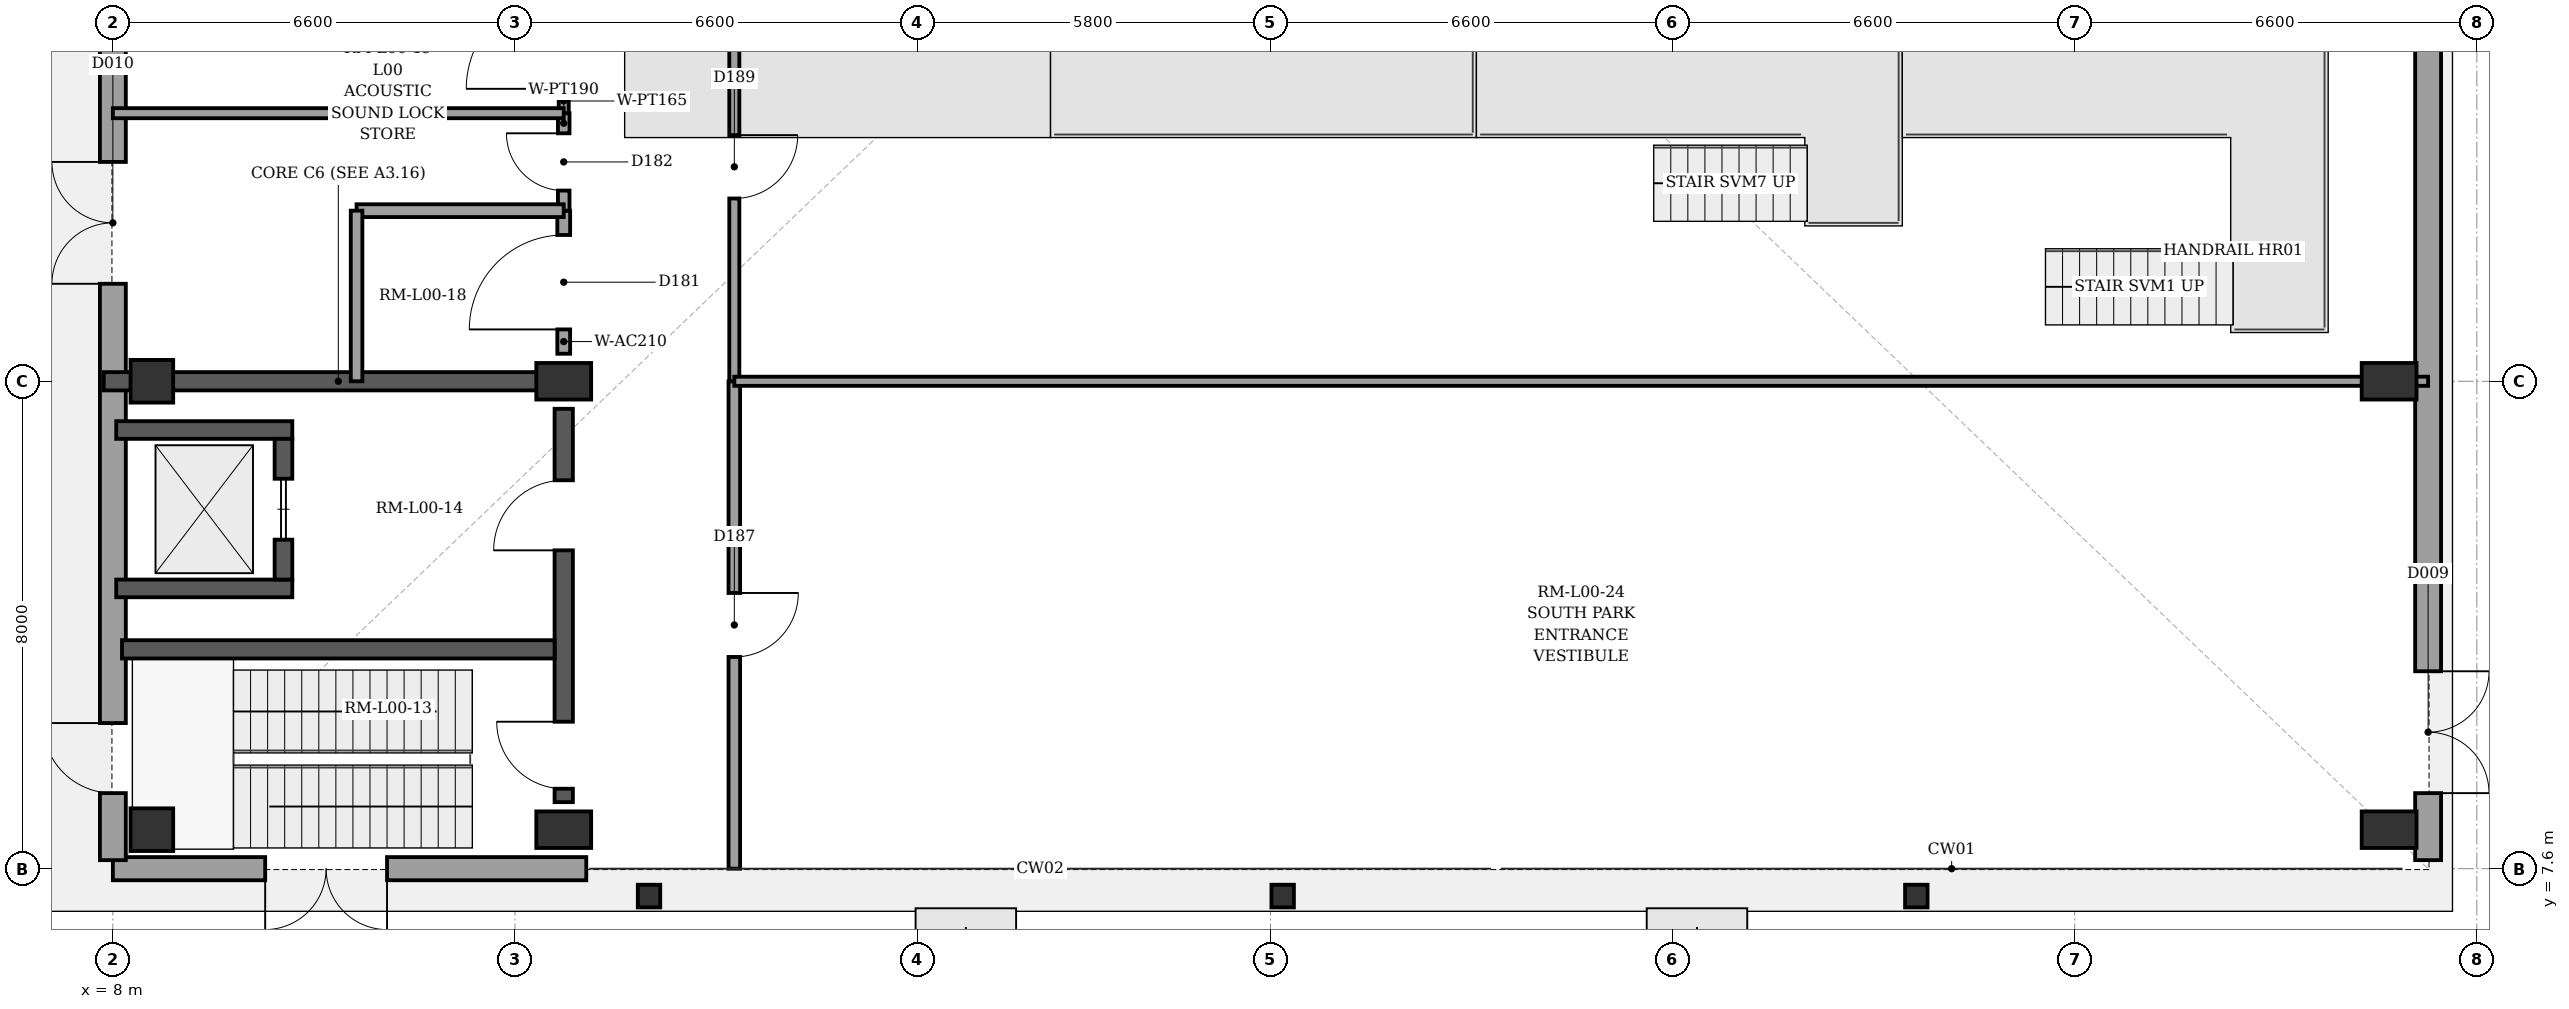
"""IFC4 building model, lengths in metres.
Left out: names, types, materials, properties, quantities, classifications, styles, units other than length and angle.
Written with IfcOpenShell. Run it as: python <this file> out.ifc"""

import sys

from ifc_helpers import new_model, si_unit, direction, frame, frame_2d, origin, origin_2d, place, context, subcontext, project, spatial, rectangle, i_section, extrude, element, fill, save


model = new_model("IFC4")
c1 = context("Model", 3, precision=1e-05, world=origin(), true_north=direction((0.0, 1.0)))
c2 = subcontext(c1, "Body", "Model", "MODEL_VIEW")
j1 = project(units=[si_unit("LENGTHUNIT", "METRE"), si_unit("PLANEANGLEUNIT", "RADIAN")], contexts=[c1])
p1 = place(None, origin())
s1 = spatial("IfcSite", under=j1, at=p1, CompositionType="ELEMENT")
p2 = place(p1, origin())
s2 = spatial("IfcBuilding", under=s1, at=p2, CompositionType="ELEMENT")
p3 = place(p2, origin())
s3 = spatial("IfcBuildingStorey", under=s2, at=p3, CompositionType="ELEMENT", Elevation=0.0)
for number, where, z_axis, x_axis in (
    (1, (8.64, 8.24, 0.0), (0.0, 0.0, 1.0), (1.0, 0.0, 0.0)),
    (2, (8.64, 15.6, 0.0), (0.0, 0.0, 1.0), (1.0, 0.0, 0.0)),
):
    element("IfcColumn", number, at=place(p3, frame(where, z_axis=z_axis, x_axis=x_axis)), inside=s3, PredefinedType="COLUMN", context=c2, shape_type="SweptSolid", body=[
        extrude(rectangle(XDim=0.7, YDim=0.7, at=origin_2d()), origin(), (0.0, 0.0, 1.0), 5.4),
    ])
for number, where, z_axis, x_axis in (
    (3, (15.4, 8.24, 0.0), (0.0, 0.0, 1.0), (1.0, 0.0, 0.0)),
    (4, (15.4, 15.6, 0.0), (0.0, 0.0, 1.0), (1.0, 0.0, 0.0)),
    (5, (45.36, 8.24, 0.0), (0.0, 0.0, 1.0), (1.0, 0.0, 0.0)),
    (6, (45.36, 15.6, 0.0), (0.0, 0.0, 1.0), (1.0, 0.0, 0.0)),
):
    element("IfcColumn", number, at=place(p3, frame(where, z_axis=z_axis, x_axis=x_axis)), inside=s3, PredefinedType="COLUMN", context=c2, shape_type="SweptSolid", body=[
        extrude(rectangle(XDim=0.6, YDim=0.9, at=origin_2d()), origin(), (0.0, 0.0, 1.0), 5.4),
    ])
for number, where, z_axis, x_axis in (
    (7, (16.8, 7.15, 0.0), (0.0, 0.0, 1.0), (1.0, 0.0, 0.0)),
    (8, (27.2, 7.15, 0.0), (0.0, 0.0, 1.0), (1.0, 0.0, 0.0)),
    (9, (37.6, 7.15, 0.0), (0.0, 0.0, 1.0), (1.0, 0.0, 0.0)),
):
    element("IfcColumn", number, at=place(p3, frame(where, z_axis=z_axis, x_axis=x_axis)), inside=s3, PredefinedType="COLUMN", context=c2, shape_type="SweptSolid", body=[
        extrude(i_section(OverallWidth=0.373, OverallDepth=0.368, WebThickness=0.014, FlangeThickness=0.024, at=origin_2d()), origin(), (0.0, 0.0, 1.0), 5.4),
    ])
p4 = place(p3, frame((46.0, 63.46, 0.0), z_axis=(0.0, 0.0, 1.0), x_axis=(0.0, -1.0, 0.0)))
e10 = element("IfcWall", 10, at=p4, inside=s3, PredefinedType="SOLIDWALL", context=c2, shape_type="SweptSolid", body=[
    extrude(rectangle(XDim=55.72, YDim=0.425, at=frame_2d((27.86, 0.0))), origin(), (0.0, 0.0, 1.0), 5.14),
])
p5 = place(p4, frame((52.62, 0.0, 0.0)))
e11 = element("IfcOpeningElement", 11, at=p5, cuts=e10, PredefinedType="OPENING", context=c2, shape_type="SweptSolid", body=[
    extrude(rectangle(XDim=2.0, YDim=2.5, at=frame_2d((1.0, 1.25))), frame((0.0, 0.222, 0.0), z_axis=(0.0, -1.0, 0.0), x_axis=(1.0, 0.0, 0.0)), (0.0, 0.0, 1.0), 0.445),
])
p6 = place(p4, frame((10.86, 0.0, 0.0)))
e12 = element("IfcOpeningElement", 12, at=p6, cuts=e10, PredefinedType="OPENING", context=c2, shape_type="SweptSolid", body=[
    extrude(rectangle(XDim=2.0, YDim=2.5, at=frame_2d((1.0, 1.25))), frame((0.0, 0.222, 0.0), z_axis=(0.0, -1.0, 0.0), x_axis=(1.0, 0.0, 0.0)), (0.0, 0.0, 1.0), 0.445),
])
p7 = place(p3, frame((15.77, 7.6, 0.0), z_axis=(0.0, 0.0, 1.0), x_axis=(-1.0, 0.0, 0.0)))
e13 = element("IfcWall", 13, at=p7, inside=s3, PredefinedType="SOLIDWALL", context=c2, shape_type="SweptSolid", body=[
    extrude(rectangle(XDim=7.77, YDim=0.38, at=frame_2d((3.885, 0.0))), origin(), (0.0, 0.0, 1.0), 5.14),
])
p8 = place(p7, frame((3.27, 0.0, 0.0)))
e14 = element("IfcOpeningElement", 14, at=p8, cuts=e13, PredefinedType="OPENING", context=c2, shape_type="SweptSolid", body=[
    extrude(rectangle(XDim=2.0, YDim=2.5, at=frame_2d((1.0, 1.25))), frame((0.0, 0.2, 0.0), z_axis=(0.0, -1.0, 0.0), x_axis=(1.0, 0.0, 0.0)), (0.0, 0.0, 1.0), 0.4),
])
p9 = place(p3, frame((8.0, 7.74, 0.0), z_axis=(0.0, 0.0, 1.0), x_axis=(0.0, 1.0, 0.0)))
e15 = element("IfcWall", 15, at=p9, inside=s3, PredefinedType="SOLIDWALL", context=c2, shape_type="SweptSolid", body=[
    extrude(rectangle(XDim=55.72, YDim=0.425, at=frame_2d((27.86, 0.0))), origin(), (0.0, 0.0, 1.0), 5.14),
])
p10 = place(p9, frame((1.1, 0.0, 0.0)))
e16 = element("IfcOpeningElement", 16, at=p10, cuts=e15, PredefinedType="OPENING", context=c2, shape_type="SweptSolid", body=[
    extrude(rectangle(XDim=1.15, YDim=2.2, at=frame_2d((0.575, 1.1))), frame((0.0, 0.222, 0.0), z_axis=(0.0, -1.0, 0.0), x_axis=(1.0, 0.0, 0.0)), (0.0, 0.0, 1.0), 0.445),
])
p11 = place(p9, frame((9.46, 0.0, 0.0)))
e17 = element("IfcOpeningElement", 17, at=p11, cuts=e15, PredefinedType="OPENING", context=c2, shape_type="SweptSolid", body=[
    extrude(rectangle(XDim=2.0, YDim=2.5, at=frame_2d((1.0, 1.25))), frame((0.0, 0.222, 0.0), z_axis=(0.0, -1.0, 0.0), x_axis=(1.0, 0.0, 0.0)), (0.0, 0.0, 1.0), 0.445),
])
p12 = place(p3, frame((7.85, 15.6, 0.0), z_axis=(0.0, 0.0, 1.0), x_axis=(1.0, 0.0, 0.0)))
e18 = element("IfcWall", 18, at=p12, inside=s3, PredefinedType="SHEAR", context=c2, shape_type="SweptSolid", body=[
    extrude(rectangle(XDim=7.248, YDim=0.3, at=frame_2d((3.624, 0.0))), origin(), (0.0, 0.0, 1.0), 5.14),
])
p13 = place(p3, frame((15.4, 8.692, 0.0), z_axis=(0.0, 0.0, 1.0), x_axis=(0.0, 1.0, 0.0)))
e19 = element("IfcWall", 19, at=p13, inside=s3, PredefinedType="SHEAR", context=c2, shape_type="SweptSolid", body=[
    extrude(rectangle(XDim=6.456, YDim=0.3, at=frame_2d((3.228, 0.0))), origin(), (0.0, 0.0, 1.0), 5.14),
])
p14 = place(p13, frame((0.22, 0.0, 0.0)))
e20 = element("IfcOpeningElement", 20, at=p14, cuts=e19, PredefinedType="OPENING", context=c2, shape_type="SweptSolid", body=[
    extrude(rectangle(XDim=1.1, YDim=2.15, at=frame_2d((0.55, 1.075))), frame((0.0, 0.16, 0.0), z_axis=(0.0, -1.0, 0.0), x_axis=(1.0, 0.0, 0.0)), (0.0, 0.0, 1.0), 0.32),
])
p15 = place(p13, frame((4.133, 0.0, 0.0)))
e21 = element("IfcOpeningElement", 21, at=p15, cuts=e19, PredefinedType="OPENING", context=c2, shape_type="SweptSolid", body=[
    extrude(rectangle(XDim=1.15, YDim=2.2, at=frame_2d((0.575, 1.1))), frame((0.0, 0.16, 0.0), z_axis=(0.0, -1.0, 0.0), x_axis=(1.0, 0.0, 0.0)), (0.0, 0.0, 1.0), 0.32),
])
p16 = place(p3, frame((8.15, 11.2, 0.0), z_axis=(0.0, 0.0, 1.0), x_axis=(1.0, 0.0, 0.0)))
e22 = element("IfcWall", 22, at=p16, inside=s3, PredefinedType="SHEAR", context=c2, shape_type="SweptSolid", body=[
    extrude(rectangle(XDim=7.1, YDim=0.3, at=frame_2d((3.55, 0.0))), origin(), (0.0, 0.0, 1.0), 5.14),
])
for number, where, z_axis, x_axis in (
    (23, (8.055, 12.2, 0.0), (0.0, 0.0, 1.0), (1.0, 0.0, 0.0)),
    (24, (8.055, 14.8, 0.0), (0.0, 0.0, 1.0), (1.0, 0.0, 0.0)),
):
    element("IfcWall", number, at=place(p3, frame(where, z_axis=z_axis, x_axis=x_axis)), inside=s3, PredefinedType="SHEAR", context=c2, shape_type="SweptSolid", body=[
        extrude(rectangle(XDim=2.89, YDim=0.29, at=frame_2d((1.445, 0.0))), origin(), (0.0, 0.0, 1.0), 5.14),
    ])
p17 = place(p3, frame((10.8, 12.345, 0.0), z_axis=(0.0, 0.0, 1.0), x_axis=(0.0, 1.0, 0.0)))
e25 = element("IfcWall", 25, at=p17, inside=s3, PredefinedType="SHEAR", context=c2, shape_type="SweptSolid", body=[
    extrude(rectangle(XDim=2.31, YDim=0.29, at=frame_2d((1.155, 0.0))), origin(), (0.0, 0.0, 1.0), 5.14),
])
p18 = place(p17, frame((0.655, 0.0, 0.0)))
e26 = element("IfcOpeningElement", 26, at=p18, cuts=e25, PredefinedType="OPENING", context=c2, shape_type="SweptSolid", body=[
    extrude(rectangle(XDim=1.0, YDim=2.15, at=frame_2d((0.5, 1.075))), frame((0.0, 0.155, 0.0), z_axis=(0.0, -1.0, 0.0), x_axis=(1.0, 0.0, 0.0)), (0.0, 0.0, 1.0), 0.31),
])
p19 = place(p3, frame((15.4, 16.052, 0.0), z_axis=(0.0, 0.0, 1.0), x_axis=(0.0, 1.0, 0.0)))
e27 = element("IfcWall", 27, at=p19, inside=s3, PredefinedType="PARTITIONING", context=c2, shape_type="SweptSolid", body=[
    extrude(rectangle(XDim=2.348, YDim=0.21, at=frame_2d((1.174, 0.0))), origin(), (0.0, 0.0, 1.0), 4.29),
])
p20 = place(p19, frame((0.399, 0.0, 0.0)))
e28 = element("IfcOpeningElement", 28, at=p20, cuts=e27, PredefinedType="OPENING", context=c2, shape_type="SweptSolid", body=[
    extrude(rectangle(XDim=1.55, YDim=2.25, at=frame_2d((0.775, 1.125))), frame((0.0, 0.115, 0.0), z_axis=(0.0, -1.0, 0.0), x_axis=(1.0, 0.0, 0.0)), (0.0, 0.0, 1.0), 0.23),
])
p21 = place(p3, frame((15.4, 18.4, 0.0), z_axis=(0.0, 0.0, 1.0), x_axis=(0.0, 1.0, 0.0)))
e29 = element("IfcWall", 29, at=p21, inside=s3, PredefinedType="PARTITIONING", context=c2, shape_type="SweptSolid", body=[
    extrude(rectangle(XDim=1.6, YDim=0.19, at=frame_2d((0.8, 0.0))), origin(), (0.0, 0.0, 1.0), 4.29),
])
p22 = place(p21, frame((0.33, 0.0, 0.0)))
e30 = element("IfcOpeningElement", 30, at=p22, cuts=e29, PredefinedType="OPENING", context=c2, shape_type="SweptSolid", body=[
    extrude(rectangle(XDim=0.94, YDim=2.15, at=frame_2d((0.47, 1.075))), frame((0.0, 0.105, 0.0), z_axis=(0.0, -1.0, 0.0), x_axis=(1.0, 0.0, 0.0)), (0.0, 0.0, 1.0), 0.21),
])
p23 = place(p3, frame((15.4, 20.0, 0.0), z_axis=(0.0, 0.0, 1.0), x_axis=(0.0, 1.0, 0.0)))
e31 = element("IfcWall", 31, at=p23, inside=s3, PredefinedType="PARTITIONING", context=c2, shape_type="SweptSolid", body=[
    extrude(rectangle(XDim=2.4, YDim=0.165, at=frame_2d((1.2, 0.0))), origin(), (0.0, 0.0, 1.0), 4.29),
])
p24 = place(p23, frame((0.4, 0.0, 0.0)))
e32 = element("IfcOpeningElement", 32, at=p24, cuts=e31, PredefinedType="OPENING", context=c2, shape_type="SweptSolid", body=[
    extrude(rectangle(XDim=1.6, YDim=2.3, at=frame_2d((0.8, 1.15))), frame((0.0, 0.093, 0.0), z_axis=(0.0, -1.0, 0.0), x_axis=(1.0, 0.0, 0.0)), (0.0, 0.0, 1.0), 0.185),
])
p25 = place(p3, frame((18.2, 15.6, 0.0), z_axis=(0.0, 0.0, 1.0), x_axis=(0.0, -1.0, 0.0)))
e33 = element("IfcWall", 33, at=p25, inside=s3, PredefinedType="PARTITIONING", context=c2, shape_type="SweptSolid", body=[
    extrude(rectangle(XDim=8.0, YDim=0.19, at=frame_2d((4.0, 0.0))), origin(), (0.0, 0.0, 1.0), 5.14),
])
p26 = place(p25, frame((3.475, 0.0, 0.0)))
e34 = element("IfcOpeningElement", 34, at=p26, cuts=e33, PredefinedType="OPENING", context=c2, shape_type="SweptSolid", body=[
    extrude(rectangle(XDim=1.05, YDim=2.15, at=frame_2d((0.525, 1.075))), frame((0.0, 0.105, 0.0), z_axis=(0.0, -1.0, 0.0), x_axis=(1.0, 0.0, 0.0)), (0.0, 0.0, 1.0), 0.21),
])
p27 = place(p3, frame((18.2, 31.6, 0.0), z_axis=(0.0, 0.0, 1.0), x_axis=(0.0, -1.0, 0.0)))
e35 = element("IfcWall", 35, at=p27, inside=s3, PredefinedType="PARTITIONING", context=c2, shape_type="SweptSolid", body=[
    extrude(rectangle(XDim=16.0, YDim=0.165, at=frame_2d((8.0, 0.0))), origin(), (0.0, 0.0, 1.0), 5.14),
])
p28 = place(p27, frame((5.98, 0.0, 0.0)))
e36 = element("IfcOpeningElement", 36, at=p28, cuts=e35, PredefinedType="OPENING", context=c2, shape_type="SweptSolid", body=[
    extrude(rectangle(XDim=1.04, YDim=2.2, at=frame_2d((0.52, 1.1))), frame((0.0, 0.093, 0.0), z_axis=(0.0, -1.0, 0.0), x_axis=(1.0, 0.0, 0.0)), (0.0, 0.0, 1.0), 0.185),
])
p29 = place(p27, frame((11.96, 0.0, 0.0)))
e37 = element("IfcOpeningElement", 37, at=p29, cuts=e35, PredefinedType="OPENING", context=c2, shape_type="SweptSolid", body=[
    extrude(rectangle(XDim=1.04, YDim=2.2, at=frame_2d((0.52, 1.1))), frame((0.0, 0.093, 0.0), z_axis=(0.0, -1.0, 0.0), x_axis=(1.0, 0.0, 0.0)), (0.0, 0.0, 1.0), 0.185),
])
p30 = place(p3, frame((12.0, 18.4, 0.0), z_axis=(0.0, 0.0, 1.0), x_axis=(1.0, 0.0, 0.0)))
e38 = element("IfcWall", 38, at=p30, inside=s3, PredefinedType="PARTITIONING", context=c2, shape_type="SweptSolid", body=[
    extrude(rectangle(XDim=3.4, YDim=0.21, at=frame_2d((1.7, 0.0))), origin(), (0.0, 0.0, 1.0), 5.14),
])
p31 = place(p3, frame((12.0, 15.6, 0.0), z_axis=(0.0, 0.0, 1.0), x_axis=(0.0, 1.0, 0.0)))
e39 = element("IfcWall", 39, at=p31, inside=s3, PredefinedType="PARTITIONING", context=c2, shape_type="SweptSolid", body=[
    extrude(rectangle(XDim=2.8, YDim=0.19, at=frame_2d((1.4, 0.0))), origin(), (0.0, 0.0, 1.0), 5.14),
])
p32 = place(p3, frame((8.0, 20.0, 0.0), z_axis=(0.0, 0.0, 1.0), x_axis=(1.0, 0.0, 0.0)))
e40 = element("IfcWall", 40, at=p32, inside=s3, PredefinedType="PARTITIONING", context=c2, shape_type="SweptSolid", body=[
    extrude(rectangle(XDim=7.4, YDim=0.165, at=frame_2d((3.7, 0.0))), origin(), (0.0, 0.0, 1.0), 5.14),
])
p33 = place(p3, frame((18.2, 15.6, 0.0), z_axis=(0.0, 0.0, 1.0), x_axis=(1.0, 0.0, 0.0)))
e41 = element("IfcWall", 41, at=p33, inside=s3, PredefinedType="PARTITIONING", context=c2, shape_type="SweptSolid", body=[
    extrude(rectangle(XDim=27.8, YDim=0.15, at=frame_2d((13.9, 0.0))), origin(), (0.0, 0.0, 1.0), 4.29),
])
p34 = place(p10, origin())
e42 = element("IfcDoor", 42, at=p34, inside=s3, OperationType="SINGLE_SWING_RIGHT", PredefinedType="DOOR", context=c2, shape_type="SweptSolid", body=[
    extrude(rectangle(XDim=1.15, YDim=2.2, at=frame_2d((0.575, 1.1))), frame((0.0, 0.025, 0.0), z_axis=(0.0, -1.0, 0.0), x_axis=(1.0, 0.0, 0.0)), (0.0, 0.0, 1.0), 0.05),
])
fill(e16, e42)
p35 = place(p8, origin())
e43 = element("IfcDoor", 43, at=p35, inside=s3, OperationType="DOUBLE_SWING_LEFT", PredefinedType="DOOR", context=c2, shape_type="SweptSolid", body=[
    extrude(rectangle(XDim=2.0, YDim=2.5, at=frame_2d((1.0, 1.25))), frame((0.0, 0.025, 0.0), z_axis=(0.0, -1.0, 0.0), x_axis=(1.0, 0.0, 0.0)), (0.0, 0.0, 1.0), 0.05),
])
fill(e14, e43)
p36 = place(p5, origin())
e44 = element("IfcDoor", 44, at=p36, inside=s3, OperationType="DOUBLE_SWING_LEFT", PredefinedType="DOOR", context=c2, shape_type="SweptSolid", body=[
    extrude(rectangle(XDim=2.0, YDim=2.5, at=frame_2d((1.0, 1.25))), frame((0.0, 0.025, 0.0), z_axis=(0.0, -1.0, 0.0), x_axis=(1.0, 0.0, 0.0)), (0.0, 0.0, 1.0), 0.05),
])
fill(e11, e44)
p37 = place(p11, origin())
e45 = element("IfcDoor", 45, at=p37, inside=s3, OperationType="DOUBLE_SWING_LEFT", PredefinedType="DOOR", context=c2, shape_type="SweptSolid", body=[
    extrude(rectangle(XDim=2.0, YDim=2.5, at=frame_2d((1.0, 1.25))), frame((0.0, 0.025, 0.0), z_axis=(0.0, -1.0, 0.0), x_axis=(1.0, 0.0, 0.0)), (0.0, 0.0, 1.0), 0.05),
])
fill(e17, e45)
p38 = place(p14, origin())
e46 = element("IfcDoor", 46, at=p38, inside=s3, OperationType="SINGLE_SWING_RIGHT", PredefinedType="DOOR", context=c2, shape_type="SweptSolid", body=[
    extrude(rectangle(XDim=1.1, YDim=2.15, at=frame_2d((0.55, 1.075))), frame((0.0, 0.025, 0.0), z_axis=(0.0, -1.0, 0.0), x_axis=(1.0, 0.0, 0.0)), (0.0, 0.0, 1.0), 0.05),
])
fill(e20, e46)
p39 = place(p15, origin())
e47 = element("IfcDoor", 47, at=p39, inside=s3, OperationType="SINGLE_SWING_LEFT", PredefinedType="DOOR", context=c2, shape_type="SweptSolid", body=[
    extrude(rectangle(XDim=1.15, YDim=2.2, at=frame_2d((0.575, 1.1))), frame((0.0, 0.025, 0.0), z_axis=(0.0, -1.0, 0.0), x_axis=(1.0, 0.0, 0.0)), (0.0, 0.0, 1.0), 0.05),
])
fill(e21, e47)
p40 = place(p18, origin())
e48 = element("IfcDoor", 48, at=p40, inside=s3, OperationType="SLIDING_TO_LEFT", PredefinedType="DOOR", context=c2, shape_type="SweptSolid", body=[
    extrude(rectangle(XDim=1.0, YDim=2.15, at=frame_2d((0.5, 1.075))), frame((0.0, 0.025, 0.0), z_axis=(0.0, -1.0, 0.0), x_axis=(1.0, 0.0, 0.0)), (0.0, 0.0, 1.0), 0.05),
])
fill(e26, e48)
p41 = place(p20, origin())
e49 = element("IfcDoor", 49, at=p41, inside=s3, OperationType="SINGLE_SWING_LEFT", PredefinedType="DOOR", context=c2, shape_type="SweptSolid", body=[
    extrude(rectangle(XDim=1.55, YDim=2.25, at=frame_2d((0.775, 1.125))), frame((0.0, 0.025, 0.0), z_axis=(0.0, -1.0, 0.0), x_axis=(1.0, 0.0, 0.0)), (0.0, 0.0, 1.0), 0.05),
])
fill(e28, e49)
p42 = place(p22, origin())
e50 = element("IfcDoor", 50, at=p42, inside=s3, OperationType="SINGLE_SWING_RIGHT", PredefinedType="DOOR", context=c2, shape_type="SweptSolid", body=[
    extrude(rectangle(XDim=0.94, YDim=2.15, at=frame_2d((0.47, 1.075))), frame((0.0, 0.025, 0.0), z_axis=(0.0, -1.0, 0.0), x_axis=(1.0, 0.0, 0.0)), (0.0, 0.0, 1.0), 0.05),
])
fill(e30, e50)
p43 = place(p24, origin())
e51 = element("IfcDoor", 51, at=p43, inside=s3, OperationType="SINGLE_SWING_LEFT", PredefinedType="DOOR", context=c2, shape_type="SweptSolid", body=[
    extrude(rectangle(XDim=1.6, YDim=2.3, at=frame_2d((0.8, 1.15))), frame((0.0, 0.025, 0.0), z_axis=(0.0, -1.0, 0.0), x_axis=(1.0, 0.0, 0.0)), (0.0, 0.0, 1.0), 0.05),
])
fill(e32, e51)
p44 = place(p26, origin())
e52 = element("IfcDoor", 52, at=p44, inside=s3, OperationType="SINGLE_SWING_LEFT", PredefinedType="DOOR", context=c2, shape_type="SweptSolid", body=[
    extrude(rectangle(XDim=1.05, YDim=2.15, at=frame_2d((0.525, 1.075))), frame((0.0, 0.025, 0.0), z_axis=(0.0, -1.0, 0.0), x_axis=(1.0, 0.0, 0.0)), (0.0, 0.0, 1.0), 0.05),
])
fill(e34, e52)
p45 = place(p29, origin())
e53 = element("IfcDoor", 53, at=p45, inside=s3, OperationType="SINGLE_SWING_LEFT", PredefinedType="DOOR", context=c2, shape_type="SweptSolid", body=[
    extrude(rectangle(XDim=1.04, YDim=2.2, at=frame_2d((0.52, 1.1))), frame((0.0, 0.025, 0.0), z_axis=(0.0, -1.0, 0.0), x_axis=(1.0, 0.0, 0.0)), (0.0, 0.0, 1.0), 0.05),
])
fill(e37, e53)
save(model, sys.argv[1])
